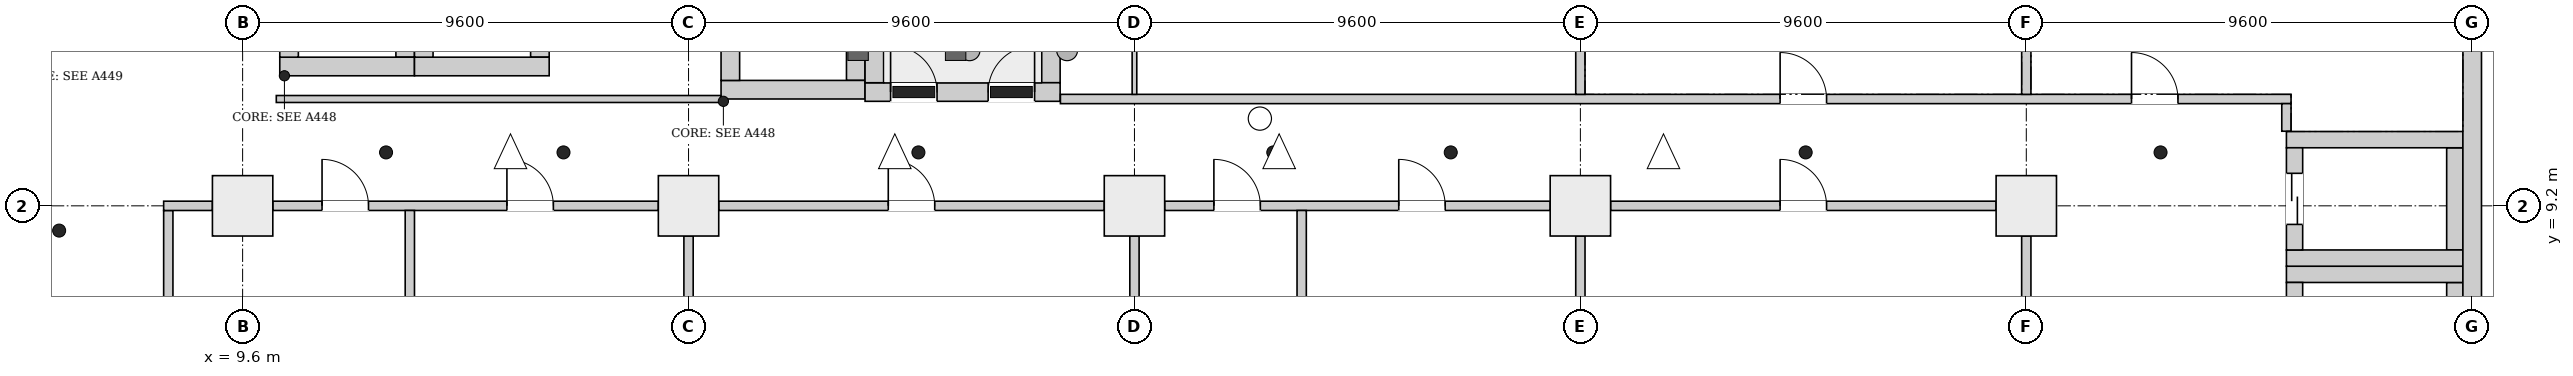
"""IFC4 building model, lengths in metres.
Left out: names, types, materials, properties, quantities, classifications, styles, units other than length and angle.
Written with IfcOpenShell. Run it as: python <this file> out.ifc"""

import sys

from ifc_helpers import new_model, si_unit, direction, frame, frame_2d, origin, origin_2d, place, context, subcontext, project, spatial, rectangle, extrude, element, fill, save


model = new_model("IFC4")
c1 = context("Model", 3, precision=1e-05, world=origin(), true_north=direction((0.0, 1.0)))
c2 = subcontext(c1, "Body", "Model", "MODEL_VIEW")
j1 = project(units=[si_unit("LENGTHUNIT", "METRE"), si_unit("PLANEANGLEUNIT", "RADIAN")], contexts=[c1])
p1 = place(None, origin())
s1 = spatial("IfcSite", under=j1, at=p1, CompositionType="ELEMENT")
p2 = place(p1, origin())
s2 = spatial("IfcBuilding", under=s1, at=p2, CompositionType="ELEMENT")
p3 = place(p2, frame((0.0, 0.0, 6.5)))
s3 = spatial("IfcBuildingStorey", under=s2, at=p3, CompositionType="ELEMENT", Elevation=6.5)
p4 = place(p3, frame((57.6, -0.2, 0.0), z_axis=(0.0, 0.0, 1.0), x_axis=(0.0, 1.0, 0.0)))
e1 = element("IfcWall", 1, at=p4, inside=s3, PredefinedType="SHEAR", context=c2, shape_type="SweptSolid", body=[
    extrude(rectangle(XDim=46.88, YDim=0.4, at=frame_2d((23.44, 0.0))), origin(), (0.0, 0.0, 1.0), 7.7),
])
p5 = place(p3, frame((23.0, 11.65, 0.0), z_axis=(0.0, 0.0, 1.0), x_axis=(1.0, 0.0, 0.0)))
e2 = element("IfcWall", 2, at=p5, inside=s3, PredefinedType="SHEAR", context=c2, shape_type="SweptSolid", body=[
    extrude(rectangle(XDim=4.2, YDim=0.4, at=frame_2d((2.1, 0.0))), origin(), (0.0, 0.0, 1.0), 7.7),
])
p6 = place(p5, frame((0.55, 0.0, 0.0)))
e3 = element("IfcOpeningElement", 3, at=p6, cuts=e2, PredefinedType="OPENING", context=c2, shape_type="SweptSolid", body=[
    extrude(rectangle(XDim=1.0, YDim=2.1, at=frame_2d((0.5, 1.05))), frame((0.0, 0.21, 0.0), z_axis=(0.0, -1.0, 0.0), x_axis=(1.0, 0.0, 0.0)), (0.0, 0.0, 1.0), 0.42),
])
p7 = place(p5, frame((2.65, 0.0, 0.0)))
e4 = element("IfcOpeningElement", 4, at=p7, cuts=e2, PredefinedType="OPENING", context=c2, shape_type="SweptSolid", body=[
    extrude(rectangle(XDim=1.0, YDim=2.1, at=frame_2d((0.5, 1.05))), frame((0.0, 0.21, 0.0), z_axis=(0.0, -1.0, 0.0), x_axis=(1.0, 0.0, 0.0)), (0.0, 0.0, 1.0), 0.42),
])
for number, where, z_axis, x_axis in (
    (5, (23.2, 11.85, 0.0), (0.0, 0.0, 1.0), (0.0, 1.0, 0.0)),
    (6, (27.0, 11.85, 0.0), (0.0, 0.0, 1.0), (0.0, 1.0, 0.0)),
):
    element("IfcWall", number, at=place(p3, frame(where, z_axis=z_axis, x_axis=x_axis)), inside=s3, PredefinedType="SHEAR", context=c2, shape_type="SweptSolid", body=[
        extrude(rectangle(XDim=6.6, YDim=0.4, at=frame_2d((3.3, 0.0))), origin(), (0.0, 0.0, 1.0), 7.7),
    ])
p8 = place(p3, frame((53.6, 7.725, 0.0), z_axis=(0.0, 0.0, 1.0), x_axis=(1.0, 0.0, 0.0)))
e7 = element("IfcWall", 7, at=p8, inside=s3, PredefinedType="SHEAR", context=c2, shape_type="SweptSolid", body=[
    extrude(rectangle(XDim=3.8, YDim=0.35, at=frame_2d((1.9, 0.0))), origin(), (0.0, 0.0, 1.0), 7.7),
])
p9 = place(p3, frame((53.775, 5.35, 0.0), z_axis=(0.0, 0.0, 1.0), x_axis=(0.0, 1.0, 0.0)))
e8 = element("IfcWall", 8, at=p9, inside=s3, PredefinedType="SHEAR", context=c2, shape_type="SweptSolid", body=[
    extrude(rectangle(XDim=2.2, YDim=0.35, at=frame_2d((1.1, 0.0))), origin(), (0.0, 0.0, 1.0), 7.7),
])
p10 = place(p9, frame((0.55, 0.0, 0.0)))
e9 = element("IfcOpeningElement", 9, at=p10, cuts=e8, PredefinedType="OPENING", context=c2, shape_type="SweptSolid", body=[
    extrude(rectangle(XDim=1.1, YDim=2.1, at=frame_2d((0.55, 1.05))), frame((0.0, 0.185, 0.0), z_axis=(0.0, -1.0, 0.0), x_axis=(1.0, 0.0, 0.0)), (0.0, 0.0, 1.0), 0.37),
])
p11 = place(p3, frame((57.225, 5.35, 0.0), z_axis=(0.0, 0.0, 1.0), x_axis=(0.0, 1.0, 0.0)))
e10 = element("IfcWall", 10, at=p11, inside=s3, PredefinedType="SHEAR", context=c2, shape_type="SweptSolid", body=[
    extrude(rectangle(XDim=2.2, YDim=0.35, at=frame_2d((1.1, 0.0))), origin(), (0.0, 0.0, 1.0), 7.7),
])
for number, where, z_axis, x_axis in (
    (11, (53.6, 8.075, 0.0), (0.0, 0.0, 1.0), (1.0, 0.0, 0.0)),
    (12, (53.6, 10.625, 0.0), (0.0, 0.0, 1.0), (1.0, 0.0, 0.0)),
):
    element("IfcWall", number, at=place(p3, frame(where, z_axis=z_axis, x_axis=x_axis)), inside=s3, PredefinedType="SHEAR", context=c2, shape_type="SweptSolid", body=[
        extrude(rectangle(XDim=3.8, YDim=0.35, at=frame_2d((1.9, 0.0))), origin(), (0.0, 0.0, 1.0), 7.7),
    ])
p12 = place(p3, frame((53.775, 8.25, 0.0), z_axis=(0.0, 0.0, 1.0), x_axis=(0.0, 1.0, 0.0)))
e13 = element("IfcWall", 13, at=p12, inside=s3, PredefinedType="SHEAR", context=c2, shape_type="SweptSolid", body=[
    extrude(rectangle(XDim=2.2, YDim=0.35, at=frame_2d((1.1, 0.0))), origin(), (0.0, 0.0, 1.0), 7.7),
])
p13 = place(p12, frame((0.55, 0.0, 0.0)))
e14 = element("IfcOpeningElement", 14, at=p13, cuts=e13, PredefinedType="OPENING", context=c2, shape_type="SweptSolid", body=[
    extrude(rectangle(XDim=1.1, YDim=2.1, at=frame_2d((0.55, 1.05))), frame((0.0, 0.185, 0.0), z_axis=(0.0, -1.0, 0.0), x_axis=(1.0, 0.0, 0.0)), (0.0, 0.0, 1.0), 0.37),
])
p14 = place(p3, frame((57.225, 8.25, 0.0), z_axis=(0.0, 0.0, 1.0), x_axis=(0.0, 1.0, 0.0)))
e15 = element("IfcWall", 15, at=p14, inside=s3, PredefinedType="SHEAR", context=c2, shape_type="SweptSolid", body=[
    extrude(rectangle(XDim=2.2, YDim=0.35, at=frame_2d((1.1, 0.0))), origin(), (0.0, 0.0, 1.0), 7.7),
])
p15 = place(p3, frame((10.4, 12.2, 0.0), z_axis=(0.0, 0.0, 1.0), x_axis=(1.0, 0.0, 0.0)))
e16 = element("IfcWall", 16, at=p15, inside=s3, PredefinedType="SHEAR", context=c2, shape_type="SweptSolid", body=[
    extrude(rectangle(XDim=2.9, YDim=0.4, at=frame_2d((1.45, 0.0))), origin(), (0.0, 0.0, 1.0), 7.7),
])
for number, where, z_axis, x_axis in (
    (17, (10.6, 12.4, 0.0), (0.0, 0.0, 1.0), (0.0, 1.0, 0.0)),
    (18, (13.1, 12.4, 0.0), (0.0, 0.0, 1.0), (0.0, 1.0, 0.0)),
):
    element("IfcWall", number, at=place(p3, frame(where, z_axis=z_axis, x_axis=x_axis)), inside=s3, PredefinedType="SHEAR", context=c2, shape_type="SweptSolid", body=[
        extrude(rectangle(XDim=3.0, YDim=0.4, at=frame_2d((1.5, 0.0))), origin(), (0.0, 0.0, 1.0), 7.7),
    ])
p16 = place(p3, frame((13.3, 12.2, 0.0), z_axis=(0.0, 0.0, 1.0), x_axis=(1.0, 0.0, 0.0)))
e19 = element("IfcWall", 19, at=p16, inside=s3, PredefinedType="SHEAR", context=c2, shape_type="SweptSolid", body=[
    extrude(rectangle(XDim=2.9, YDim=0.4, at=frame_2d((1.45, 0.0))), origin(), (0.0, 0.0, 1.0), 7.7),
])
for number, where, z_axis, x_axis in (
    (20, (13.5, 12.4, 0.0), (0.0, 0.0, 1.0), (0.0, 1.0, 0.0)),
    (21, (16.0, 12.4, 0.0), (0.0, 0.0, 1.0), (0.0, 1.0, 0.0)),
):
    element("IfcWall", number, at=place(p3, frame(where, z_axis=z_axis, x_axis=x_axis)), inside=s3, PredefinedType="SHEAR", context=c2, shape_type="SweptSolid", body=[
        extrude(rectangle(XDim=3.0, YDim=0.4, at=frame_2d((1.5, 0.0))), origin(), (0.0, 0.0, 1.0), 7.7),
    ])
p17 = place(p3, frame((19.9, 11.7, 0.0), z_axis=(0.0, 0.0, 1.0), x_axis=(1.0, 0.0, 0.0)))
e22 = element("IfcWall", 22, at=p17, inside=s3, PredefinedType="SHEAR", context=c2, shape_type="SweptSolid", body=[
    extrude(rectangle(XDim=3.1, YDim=0.4, at=frame_2d((1.55, 0.0))), origin(), (0.0, 0.0, 1.0), 7.7),
])
for number, where, z_axis, x_axis in (
    (23, (20.1, 11.9, 0.0), (0.0, 0.0, 1.0), (0.0, 1.0, 0.0)),
    (24, (22.8, 11.9, 0.0), (0.0, 0.0, 1.0), (0.0, 1.0, 0.0)),
):
    element("IfcWall", number, at=place(p3, frame(where, z_axis=z_axis, x_axis=x_axis)), inside=s3, PredefinedType="SHEAR", context=c2, shape_type="SweptSolid", body=[
        extrude(rectangle(XDim=3.4, YDim=0.4, at=frame_2d((1.7, 0.0))), origin(), (0.0, 0.0, 1.0), 7.7),
    ])
for number, where, z_axis, x_axis in (
    (25, (9.6, 9.2, 0.0), (0.0, 0.0, 1.0), (1.0, 0.0, 0.0)),
    (26, (19.2, 9.2, 0.0), (0.0, 0.0, 1.0), (1.0, 0.0, 0.0)),
    (27, (28.8, 9.2, 0.0), (0.0, 0.0, 1.0), (1.0, 0.0, 0.0)),
    (28, (38.4, 9.2, 0.0), (0.0, 0.0, 1.0), (1.0, 0.0, 0.0)),
    (29, (48.0, 9.2, 0.0), (0.0, 0.0, 1.0), (1.0, 0.0, 0.0)),
):
    element("IfcColumn", number, at=place(p3, frame(where, z_axis=z_axis, x_axis=x_axis)), inside=s3, PredefinedType="COLUMN", context=c2, shape_type="SweptSolid", body=[
        extrude(rectangle(XDim=1.3, YDim=1.3, at=origin_2d()), origin(), (0.0, 0.0, 1.0), 7.7),
    ])
p18 = place(p3, frame((8.0, 0.206, 0.0), z_axis=(0.0, 0.0, 1.0), x_axis=(0.0, 1.0, 0.0)))
e30 = element("IfcWall", 30, at=p18, inside=s3, PredefinedType="PARTITIONING", context=c2, shape_type="SweptSolid", body=[
    extrude(rectangle(XDim=8.894, YDim=0.2, at=frame_2d((4.447, 0.0))), origin(), (0.0, 0.0, 1.0), 7.35),
])
p19 = place(p3, frame((7.9, 9.2, 0.0), z_axis=(0.0, 0.0, 1.0), x_axis=(1.0, 0.0, 0.0)))
e31 = element("IfcWall", 31, at=p19, inside=s3, PredefinedType="PARTITIONING", context=c2, shape_type="SweptSolid", body=[
    extrude(rectangle(XDim=1.05, YDim=0.2, at=frame_2d((0.525, 0.0))), origin(), (0.0, 0.0, 1.0), 6.95),
])
p20 = place(p3, frame((10.25, 9.2, 0.0), z_axis=(0.0, 0.0, 1.0), x_axis=(1.0, 0.0, 0.0)))
e32 = element("IfcWall", 32, at=p20, inside=s3, PredefinedType="PARTITIONING", context=c2, shape_type="SweptSolid", body=[
    extrude(rectangle(XDim=8.3, YDim=0.2, at=frame_2d((4.15, 0.0))), origin(), (0.0, 0.0, 1.0), 6.95),
])
p21 = place(p20, frame((1.06, 0.0, 0.0)))
e33 = element("IfcOpeningElement", 33, at=p21, cuts=e32, PredefinedType="OPENING", context=c2, shape_type="SweptSolid", body=[
    extrude(rectangle(XDim=1.0, YDim=2.1, at=frame_2d((0.5, 1.05))), frame((0.0, 0.11, 0.0), z_axis=(0.0, -1.0, 0.0), x_axis=(1.0, 0.0, 0.0)), (0.0, 0.0, 1.0), 0.22),
])
p22 = place(p20, frame((5.04, 0.0, 0.0)))
e34 = element("IfcOpeningElement", 34, at=p22, cuts=e32, PredefinedType="OPENING", context=c2, shape_type="SweptSolid", body=[
    extrude(rectangle(XDim=1.0, YDim=2.1, at=frame_2d((0.5, 1.05))), frame((0.0, 0.11, 0.0), z_axis=(0.0, -1.0, 0.0), x_axis=(1.0, 0.0, 0.0)), (0.0, 0.0, 1.0), 0.22),
])
p23 = place(p3, frame((10.325, 11.5, 0.0), z_axis=(0.0, 0.0, 1.0), x_axis=(1.0, 0.0, 0.0)))
e35 = element("IfcWall", 35, at=p23, inside=s3, PredefinedType="PARTITIONING", context=c2, shape_type="SweptSolid", body=[
    extrude(rectangle(XDim=9.569, YDim=0.15, at=frame_2d((4.785, 0.0))), origin(), (0.0, 0.0, 1.0), 7.35),
])
p24 = place(p3, frame((13.2, 0.206, 0.0), z_axis=(0.0, 0.0, 1.0), x_axis=(0.0, 1.0, 0.0)))
e36 = element("IfcWall", 36, at=p24, inside=s3, PredefinedType="PARTITIONING", context=c2, shape_type="SweptSolid", body=[
    extrude(rectangle(XDim=8.894, YDim=0.2, at=frame_2d((4.447, 0.0))), origin(), (0.0, 0.0, 1.0), 7.35),
])
p25 = place(p3, frame((19.2, 1.1, 0.0), z_axis=(0.0, 0.0, 1.0), x_axis=(0.0, 1.0, 0.0)))
e37 = element("IfcWall", 37, at=p25, inside=s3, PredefinedType="PARTITIONING", context=c2, shape_type="SweptSolid", body=[
    extrude(rectangle(XDim=7.45, YDim=0.2, at=frame_2d((3.725, 0.0))), origin(), (0.0, 0.0, 1.0), 6.95),
])
p26 = place(p3, frame((19.85, 9.2, 0.0), z_axis=(0.0, 0.0, 1.0), x_axis=(1.0, 0.0, 0.0)))
e38 = element("IfcWall", 38, at=p26, inside=s3, PredefinedType="PARTITIONING", context=c2, shape_type="SweptSolid", body=[
    extrude(rectangle(XDim=8.3, YDim=0.2, at=frame_2d((4.15, 0.0))), origin(), (0.0, 0.0, 1.0), 6.95),
])
p27 = place(p26, frame((3.65, 0.0, 0.0)))
e39 = element("IfcOpeningElement", 39, at=p27, cuts=e38, PredefinedType="OPENING", context=c2, shape_type="SweptSolid", body=[
    extrude(rectangle(XDim=1.0, YDim=2.1, at=frame_2d((0.5, 1.05))), frame((0.0, 0.11, 0.0), z_axis=(0.0, -1.0, 0.0), x_axis=(1.0, 0.0, 0.0)), (0.0, 0.0, 1.0), 0.22),
])
p28 = place(p3, frame((27.206, 11.5, 0.0), z_axis=(0.0, 0.0, 1.0), x_axis=(1.0, 0.0, 0.0)))
e40 = element("IfcWall", 40, at=p28, inside=s3, PredefinedType="PARTITIONING", context=c2, shape_type="SweptSolid", body=[
    extrude(rectangle(XDim=26.494, YDim=0.2, at=frame_2d((13.247, 0.0))), origin(), (0.0, 0.0, 1.0), 7.35),
])
p29 = place(p28, frame((15.494, 0.0, 0.0)))
e41 = element("IfcOpeningElement", 41, at=p29, cuts=e40, PredefinedType="OPENING", context=c2, shape_type="SweptSolid", body=[
    extrude(rectangle(XDim=1.0, YDim=2.1, at=frame_2d((0.5, 1.05))), frame((0.0, 0.11, 0.0), z_axis=(0.0, -1.0, 0.0), x_axis=(1.0, 0.0, 0.0)), (0.0, 0.0, 1.0), 0.22),
])
p30 = place(p28, frame((23.059, 0.0, 0.0)))
e42 = element("IfcOpeningElement", 42, at=p30, cuts=e40, PredefinedType="OPENING", context=c2, shape_type="SweptSolid", body=[
    extrude(rectangle(XDim=1.0, YDim=2.1, at=frame_2d((0.5, 1.05))), frame((0.0, 0.11, 0.0), z_axis=(0.0, -1.0, 0.0), x_axis=(1.0, 0.0, 0.0)), (0.0, 0.0, 1.0), 0.22),
])
p31 = place(p3, frame((28.8, 1.1, 0.0), z_axis=(0.0, 0.0, 1.0), x_axis=(0.0, 1.0, 0.0)))
e43 = element("IfcWall", 43, at=p31, inside=s3, PredefinedType="PARTITIONING", context=c2, shape_type="SweptSolid", body=[
    extrude(rectangle(XDim=7.45, YDim=0.2, at=frame_2d((3.725, 0.0))), origin(), (0.0, 0.0, 1.0), 6.95),
])
p32 = place(p3, frame((28.8, 11.6, 0.0), z_axis=(0.0, 0.0, 1.0), x_axis=(0.0, 1.0, 0.0)))
e44 = element("IfcWall", 44, at=p32, inside=s3, PredefinedType="PARTITIONING", context=c2, shape_type="SweptSolid", body=[
    extrude(rectangle(XDim=4.025, YDim=0.1, at=frame_2d((2.012, 0.0))), origin(), (0.0, 0.0, 1.0), 6.95),
])
p33 = place(p3, frame((29.45, 9.2, 0.0), z_axis=(0.0, 0.0, 1.0), x_axis=(1.0, 0.0, 0.0)))
e45 = element("IfcWall", 45, at=p33, inside=s3, PredefinedType="PARTITIONING", context=c2, shape_type="SweptSolid", body=[
    extrude(rectangle(XDim=8.3, YDim=0.2, at=frame_2d((4.15, 0.0))), origin(), (0.0, 0.0, 1.0), 6.95),
])
p34 = place(p33, frame((1.06, 0.0, 0.0)))
e46 = element("IfcOpeningElement", 46, at=p34, cuts=e45, PredefinedType="OPENING", context=c2, shape_type="SweptSolid", body=[
    extrude(rectangle(XDim=1.0, YDim=2.1, at=frame_2d((0.5, 1.05))), frame((0.0, 0.11, 0.0), z_axis=(0.0, -1.0, 0.0), x_axis=(1.0, 0.0, 0.0)), (0.0, 0.0, 1.0), 0.22),
])
p35 = place(p33, frame((5.04, 0.0, 0.0)))
e47 = element("IfcOpeningElement", 47, at=p35, cuts=e45, PredefinedType="OPENING", context=c2, shape_type="SweptSolid", body=[
    extrude(rectangle(XDim=1.0, YDim=2.1, at=frame_2d((0.5, 1.05))), frame((0.0, 0.11, 0.0), z_axis=(0.0, -1.0, 0.0), x_axis=(1.0, 0.0, 0.0)), (0.0, 0.0, 1.0), 0.22),
])
p36 = place(p3, frame((32.4, 0.206, 0.0), z_axis=(0.0, 0.0, 1.0), x_axis=(0.0, 1.0, 0.0)))
e48 = element("IfcWall", 48, at=p36, inside=s3, PredefinedType="PARTITIONING", context=c2, shape_type="SweptSolid", body=[
    extrude(rectangle(XDim=8.894, YDim=0.2, at=frame_2d((4.447, 0.0))), origin(), (0.0, 0.0, 1.0), 7.35),
])
p37 = place(p3, frame((38.4, 1.1, 0.0), z_axis=(0.0, 0.0, 1.0), x_axis=(0.0, 1.0, 0.0)))
e49 = element("IfcWall", 49, at=p37, inside=s3, PredefinedType="PARTITIONING", context=c2, shape_type="SweptSolid", body=[
    extrude(rectangle(XDim=7.45, YDim=0.2, at=frame_2d((3.725, 0.0))), origin(), (0.0, 0.0, 1.0), 6.95),
])
p38 = place(p3, frame((38.4, 11.6, 0.0), z_axis=(0.0, 0.0, 1.0), x_axis=(0.0, 1.0, 0.0)))
e50 = element("IfcWall", 50, at=p38, inside=s3, PredefinedType="PARTITIONING", context=c2, shape_type="SweptSolid", body=[
    extrude(rectangle(XDim=6.15, YDim=0.2, at=frame_2d((3.075, 0.0))), origin(), (0.0, 0.0, 1.0), 6.95),
])
p39 = place(p3, frame((39.05, 9.2, 0.0), z_axis=(0.0, 0.0, 1.0), x_axis=(1.0, 0.0, 0.0)))
e51 = element("IfcWall", 51, at=p39, inside=s3, PredefinedType="PARTITIONING", context=c2, shape_type="SweptSolid", body=[
    extrude(rectangle(XDim=8.3, YDim=0.2, at=frame_2d((4.15, 0.0))), origin(), (0.0, 0.0, 1.0), 6.95),
])
p40 = place(p39, frame((3.65, 0.0, 0.0)))
e52 = element("IfcOpeningElement", 52, at=p40, cuts=e51, PredefinedType="OPENING", context=c2, shape_type="SweptSolid", body=[
    extrude(rectangle(XDim=1.0, YDim=2.1, at=frame_2d((0.5, 1.05))), frame((0.0, 0.11, 0.0), z_axis=(0.0, -1.0, 0.0), x_axis=(1.0, 0.0, 0.0)), (0.0, 0.0, 1.0), 0.22),
])
p41 = place(p3, frame((48.0, 1.1, 0.0), z_axis=(0.0, 0.0, 1.0), x_axis=(0.0, 1.0, 0.0)))
e53 = element("IfcWall", 53, at=p41, inside=s3, PredefinedType="PARTITIONING", context=c2, shape_type="SweptSolid", body=[
    extrude(rectangle(XDim=7.45, YDim=0.2, at=frame_2d((3.725, 0.0))), origin(), (0.0, 0.0, 1.0), 6.95),
])
p42 = place(p3, frame((48.0, 11.6, 0.0), z_axis=(0.0, 0.0, 1.0), x_axis=(0.0, 1.0, 0.0)))
e54 = element("IfcWall", 54, at=p42, inside=s3, PredefinedType="PARTITIONING", context=c2, shape_type="SweptSolid", body=[
    extrude(rectangle(XDim=6.15, YDim=0.2, at=frame_2d((3.075, 0.0))), origin(), (0.0, 0.0, 1.0), 6.95),
])
p43 = place(p3, frame((53.6, 10.806, 0.0), z_axis=(0.0, 0.0, 1.0), x_axis=(0.0, 1.0, 0.0)))
e55 = element("IfcWall", 55, at=p43, inside=s3, PredefinedType="PARTITIONING", context=c2, shape_type="SweptSolid", body=[
    extrude(rectangle(XDim=0.594, YDim=0.2, at=frame_2d((0.297, 0.0))), origin(), (0.0, 0.0, 1.0), 7.35),
])
p44 = place(p6, origin())
e56 = element("IfcDoor", 56, at=p44, inside=s3, OperationType="SINGLE_SWING_RIGHT", PredefinedType="DOOR", context=c2, shape_type="SweptSolid", body=[
    extrude(rectangle(XDim=1.0, YDim=2.1, at=frame_2d((0.5, 1.05))), frame((0.0, 0.025, 0.0), z_axis=(0.0, -1.0, 0.0), x_axis=(1.0, 0.0, 0.0)), (0.0, 0.0, 1.0), 0.05),
])
fill(e3, e56)
p45 = place(p7, origin())
e57 = element("IfcDoor", 57, at=p45, inside=s3, OperationType="SINGLE_SWING_LEFT", PredefinedType="DOOR", context=c2, shape_type="SweptSolid", body=[
    extrude(rectangle(XDim=1.0, YDim=2.1, at=frame_2d((0.5, 1.05))), frame((0.0, 0.025, 0.0), z_axis=(0.0, -1.0, 0.0), x_axis=(1.0, 0.0, 0.0)), (0.0, 0.0, 1.0), 0.05),
])
fill(e4, e57)
p46 = place(p13, origin())
e58 = element("IfcDoor", 58, at=p46, inside=s3, OperationType="DOUBLE_DOOR_SLIDING", PredefinedType="DOOR", context=c2, shape_type="SweptSolid", body=[
    extrude(rectangle(XDim=1.1, YDim=2.1, at=frame_2d((0.55, 1.05))), frame((0.0, 0.025, 0.0), z_axis=(0.0, -1.0, 0.0), x_axis=(1.0, 0.0, 0.0)), (0.0, 0.0, 1.0), 0.05),
])
fill(e14, e58)
p47 = place(p29, origin())
e59 = element("IfcDoor", 59, at=p47, inside=s3, OperationType="SINGLE_SWING_RIGHT", PredefinedType="DOOR", context=c2, shape_type="SweptSolid", body=[
    extrude(rectangle(XDim=1.0, YDim=2.1, at=frame_2d((0.5, 1.05))), frame((0.0, 0.025, 0.0), z_axis=(0.0, -1.0, 0.0), x_axis=(1.0, 0.0, 0.0)), (0.0, 0.0, 1.0), 0.05),
])
fill(e41, e59)
p48 = place(p30, origin())
e60 = element("IfcDoor", 60, at=p48, inside=s3, OperationType="SINGLE_SWING_LEFT", PredefinedType="DOOR", context=c2, shape_type="SweptSolid", body=[
    extrude(rectangle(XDim=1.0, YDim=2.1, at=frame_2d((0.5, 1.05))), frame((0.0, 0.025, 0.0), z_axis=(0.0, -1.0, 0.0), x_axis=(1.0, 0.0, 0.0)), (0.0, 0.0, 1.0), 0.05),
])
fill(e42, e60)
p49 = place(p21, origin())
e61 = element("IfcDoor", 61, at=p49, inside=s3, OperationType="SINGLE_SWING_LEFT", PredefinedType="DOOR", context=c2, shape_type="SweptSolid", body=[
    extrude(rectangle(XDim=1.0, YDim=2.1, at=frame_2d((0.5, 1.05))), frame((0.0, 0.025, 0.0), z_axis=(0.0, -1.0, 0.0), x_axis=(1.0, 0.0, 0.0)), (0.0, 0.0, 1.0), 0.05),
])
fill(e33, e61)
p50 = place(p22, origin())
e62 = element("IfcDoor", 62, at=p50, inside=s3, OperationType="SINGLE_SWING_RIGHT", PredefinedType="DOOR", context=c2, shape_type="SweptSolid", body=[
    extrude(rectangle(XDim=1.0, YDim=2.1, at=frame_2d((0.5, 1.05))), frame((0.0, 0.025, 0.0), z_axis=(0.0, -1.0, 0.0), x_axis=(1.0, 0.0, 0.0)), (0.0, 0.0, 1.0), 0.05),
])
fill(e34, e62)
p51 = place(p27, origin())
e63 = element("IfcDoor", 63, at=p51, inside=s3, OperationType="SINGLE_SWING_LEFT", PredefinedType="DOOR", context=c2, shape_type="SweptSolid", body=[
    extrude(rectangle(XDim=1.0, YDim=2.1, at=frame_2d((0.5, 1.05))), frame((0.0, 0.025, 0.0), z_axis=(0.0, -1.0, 0.0), x_axis=(1.0, 0.0, 0.0)), (0.0, 0.0, 1.0), 0.05),
])
fill(e39, e63)
p52 = place(p34, origin())
e64 = element("IfcDoor", 64, at=p52, inside=s3, OperationType="SINGLE_SWING_LEFT", PredefinedType="DOOR", context=c2, shape_type="SweptSolid", body=[
    extrude(rectangle(XDim=1.0, YDim=2.1, at=frame_2d((0.5, 1.05))), frame((0.0, 0.025, 0.0), z_axis=(0.0, -1.0, 0.0), x_axis=(1.0, 0.0, 0.0)), (0.0, 0.0, 1.0), 0.05),
])
fill(e46, e64)
p53 = place(p35, origin())
e65 = element("IfcDoor", 65, at=p53, inside=s3, OperationType="SINGLE_SWING_RIGHT", PredefinedType="DOOR", context=c2, shape_type="SweptSolid", body=[
    extrude(rectangle(XDim=1.0, YDim=2.1, at=frame_2d((0.5, 1.05))), frame((0.0, 0.025, 0.0), z_axis=(0.0, -1.0, 0.0), x_axis=(1.0, 0.0, 0.0)), (0.0, 0.0, 1.0), 0.05),
])
fill(e47, e65)
p54 = place(p40, origin())
e66 = element("IfcDoor", 66, at=p54, inside=s3, OperationType="SINGLE_SWING_RIGHT", PredefinedType="DOOR", context=c2, shape_type="SweptSolid", body=[
    extrude(rectangle(XDim=1.0, YDim=2.1, at=frame_2d((0.5, 1.05))), frame((0.0, 0.025, 0.0), z_axis=(0.0, -1.0, 0.0), x_axis=(1.0, 0.0, 0.0)), (0.0, 0.0, 1.0), 0.05),
])
fill(e52, e66)
save(model, sys.argv[1])
